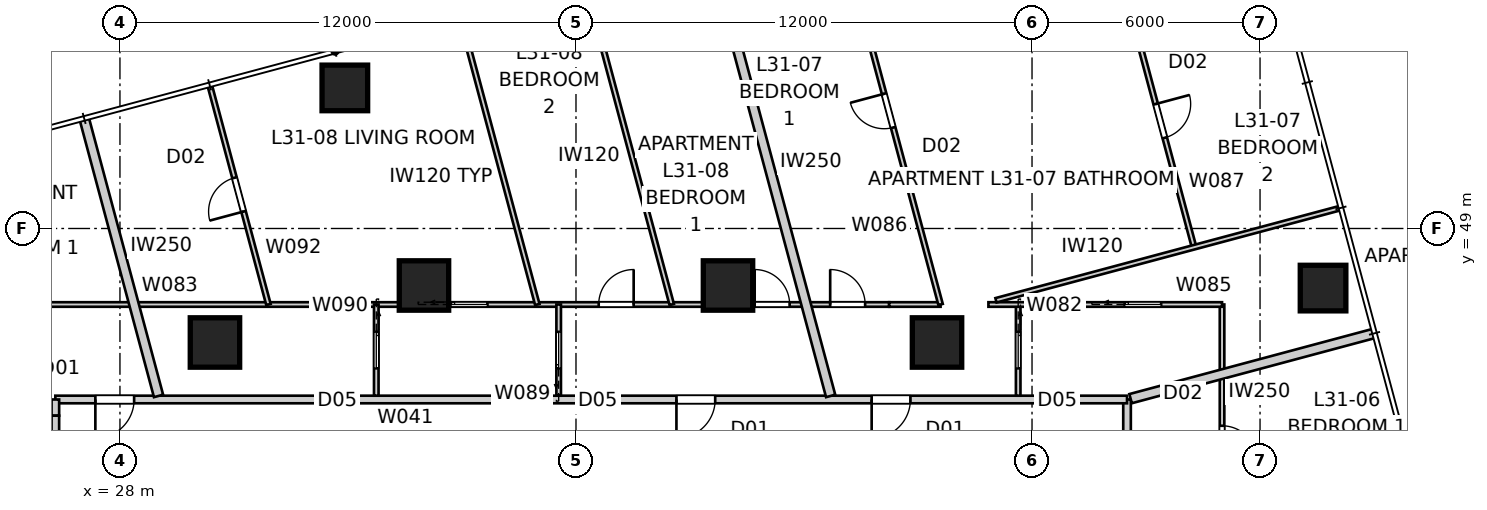
"""IFC4 building model, lengths in metres.
Left out: names, types, materials, properties, quantities, classifications, styles, units other than length and angle.
Written with IfcOpenShell. Run it as: python <this file> out.ifc"""

import sys

from ifc_helpers import new_model, si_unit, direction, frame, frame_2d, origin, origin_2d, place, context, subcontext, project, spatial, rectangle, extrude, element, fill, save


model = new_model("IFC4")
c1 = context("Model", 3, precision=1e-05, world=origin(), true_north=direction((0.0, 1.0)))
c2 = subcontext(c1, "Body", "Model", "MODEL_VIEW")
j1 = project(units=[si_unit("LENGTHUNIT", "METRE"), si_unit("PLANEANGLEUNIT", "RADIAN")], contexts=[c1])
p1 = place(None, origin())
s1 = spatial("IfcSite", under=j1, at=p1, CompositionType="ELEMENT")
p2 = place(p1, origin())
s2 = spatial("IfcBuilding", under=s1, at=p2, CompositionType="ELEMENT")
p3 = place(p2, frame((0.0, 0.0, 115.0)))
s3 = spatial("IfcBuildingStorey", under=s2, at=p3, CompositionType="ELEMENT", Elevation=115.0)
for number, where, z_axis, x_axis in (
    (1, (59.658, 47.432, 0.0), (0.0, 0.0, 1.0), (1.0, 0.0, 0.0)),
    (2, (33.918, 52.699, 0.0), (0.0, 0.0, 1.0), (1.0, 0.0, 0.0)),
):
    element("IfcColumn", number, at=place(p3, frame(where, z_axis=z_axis, x_axis=x_axis)), inside=s3, PredefinedType="COLUMN", context=c2, shape_type="SweptSolid", body=[
        extrude(rectangle(XDim=1.2, YDim=1.2, at=origin_2d()), origin(), (0.0, 0.0, 1.0), 3.4),
    ])
for number, where, z_axis, x_axis in (
    (3, (49.5, 46.0, 0.0), (0.0, 0.0, 1.0), (1.0, 0.0, 0.0)),
    (4, (44.0, 47.5, 0.0), (0.0, 0.0, 1.0), (1.0, 0.0, 0.0)),
    (5, (36.0, 47.5, 0.0), (0.0, 0.0, 1.0), (1.0, 0.0, 0.0)),
    (6, (30.5, 46.0, 0.0), (0.0, 0.0, 1.0), (1.0, 0.0, 0.0)),
):
    element("IfcColumn", number, at=place(p3, frame(where, z_axis=z_axis, x_axis=x_axis)), inside=s3, PredefinedType="COLUMN", context=c2, shape_type="SweptSolid", body=[
        extrude(rectangle(XDim=1.3, YDim=1.3, at=origin_2d()), origin(), (0.0, 0.0, 1.0), 3.4),
    ])
p4 = place(p3, frame((54.5, 15.5, 0.0), z_axis=(0.0, 0.0, 1.0), x_axis=(0.0, 1.0, 0.0)))
e7 = element("IfcWall", 7, at=p4, inside=s3, PredefinedType="PARTITIONING", context=c2, shape_type="SweptSolid", body=[
    extrude(rectangle(XDim=29.0, YDim=0.2, at=frame_2d((14.5, 0.0))), origin(), (0.0, 0.0, 1.0), 3.25),
])
p5 = place(p4, frame((24.76, 0.0, 0.0)))
e8 = element("IfcOpeningElement", 8, at=p5, cuts=e7, PredefinedType="OPENING", context=c2, shape_type="SweptSolid", body=[
    extrude(rectangle(XDim=1.02, YDim=2.1, at=frame_2d((0.51, 1.05))), frame((0.0, 0.11, 0.0), z_axis=(0.0, -1.0, 0.0), x_axis=(1.0, 0.0, 0.0)), (0.0, 0.0, 1.0), 0.22),
])
p6 = place(p4, frame((5.829, 0.0, 0.0)))
e9 = element("IfcOpeningElement", 9, at=p6, cuts=e7, PredefinedType="OPENING", context=c2, shape_type="SweptSolid", body=[
    extrude(rectangle(XDim=1.02, YDim=2.34, at=frame_2d((0.51, 1.17))), frame((0.0, 0.11, 0.0), z_axis=(0.0, -1.0, 0.0), x_axis=(1.0, 0.0, 0.0)), (0.0, 0.0, 1.0), 0.22),
])
p7 = place(p4, frame((9.559, 0.0, 0.0)))
e10 = element("IfcOpeningElement", 10, at=p7, cuts=e7, PredefinedType="OPENING", context=c2, shape_type="SweptSolid", body=[
    extrude(rectangle(XDim=1.02, YDim=2.34, at=frame_2d((0.51, 1.17))), frame((0.0, 0.11, 0.0), z_axis=(0.0, -1.0, 0.0), x_axis=(1.0, 0.0, 0.0)), (0.0, 0.0, 1.0), 0.22),
])
p8 = place(p3, frame((54.5, 44.5, 0.0), z_axis=(0.0, 0.0, 1.0), x_axis=(-1.0, 0.0, 0.0)))
e11 = element("IfcWall", 11, at=p8, inside=s3, PredefinedType="PARTITIONING", context=c2, shape_type="SweptSolid", body=[
    extrude(rectangle(XDim=28.2, YDim=0.2, at=frame_2d((14.1, 0.0))), origin(), (0.0, 0.0, 1.0), 3.25),
])
p9 = place(p8, frame((10.837, 0.0, 0.0)))
e12 = element("IfcOpeningElement", 12, at=p9, cuts=e11, PredefinedType="OPENING", context=c2, shape_type="SweptSolid", body=[
    extrude(rectangle(XDim=1.02, YDim=2.34, at=frame_2d((0.51, 1.17))), frame((0.0, 0.11, 0.0), z_axis=(0.0, -1.0, 0.0), x_axis=(1.0, 0.0, 0.0)), (0.0, 0.0, 1.0), 0.22),
])
p10 = place(p8, frame((5.7, 0.0, 0.0)))
e13 = element("IfcOpeningElement", 13, at=p10, cuts=e11, PredefinedType="OPENING", context=c2, shape_type="SweptSolid", body=[
    extrude(rectangle(XDim=1.02, YDim=2.34, at=frame_2d((0.51, 1.17))), frame((0.0, 0.11, 0.0), z_axis=(0.0, -1.0, 0.0), x_axis=(1.0, 0.0, 0.0)), (0.0, 0.0, 1.0), 0.22),
])
p11 = place(p8, frame((26.127, 0.0, 0.0)))
e14 = element("IfcOpeningElement", 14, at=p11, cuts=e11, PredefinedType="OPENING", context=c2, shape_type="SweptSolid", body=[
    extrude(rectangle(XDim=1.02, YDim=2.34, at=frame_2d((0.51, 1.17))), frame((0.0, 0.11, 0.0), z_axis=(0.0, -1.0, 0.0), x_axis=(1.0, 0.0, 0.0)), (0.0, 0.0, 1.0), 0.22),
])
p12 = place(p3, frame((26.3, 44.5, 0.0), z_axis=(0.0, 0.0, 1.0), x_axis=(0.0, -1.0, 0.0)))
e15 = element("IfcWall", 15, at=p12, inside=s3, PredefinedType="PARTITIONING", context=c2, shape_type="SweptSolid", body=[
    extrude(rectangle(XDim=0.426, YDim=0.2, at=frame_2d((0.213, 0.0))), origin(), (0.0, 0.0, 1.0), 3.25),
])
p13 = place(p3, frame((26.3, 44.074, 0.0), z_axis=(0.0, 0.0, 1.0), x_axis=(0.0, -1.0, 0.0)))
e16 = element("IfcWall", 16, at=p13, inside=s3, PredefinedType="PARTITIONING", context=c2, shape_type="SweptSolid", body=[
    extrude(rectangle(XDim=1.554, YDim=0.2, at=frame_2d((0.777, 0.0))), origin(), (0.0, 0.0, 1.0), 2.722),
])
p14 = place(p3, frame((43.56, 56.318, 0.0), z_axis=(0.0, 0.0, 1.0), x_axis=(0.258824223352, -0.965924438766, 0.0)))
e17 = element("IfcWall", 17, at=p14, inside=s3, PredefinedType="PARTITIONING", context=c2, shape_type="SweptSolid", body=[
    extrude(rectangle(XDim=12.138, YDim=0.25, at=frame_2d((6.069, 0.0))), origin(), (0.0, 0.0, 1.0), 3.25),
])
p15 = place(p3, frame((27.058, 51.896, 0.0), z_axis=(0.0, 0.0, 1.0), x_axis=(0.258822171171, -0.965924988656, 0.0)))
e18 = element("IfcWall", 18, at=p15, inside=s3, PredefinedType="PARTITIONING", context=c2, shape_type="SweptSolid", body=[
    extrude(rectangle(XDim=7.56, YDim=0.25, at=frame_2d((3.78, 0.0))), origin(), (0.0, 0.0, 1.0), 3.25),
])
p16 = place(p3, frame((61.012, 46.242, 0.0), z_axis=(0.0, 0.0, 1.0), x_axis=(-0.965929355837, -0.25880587229, 0.0)))
e19 = element("IfcWall", 19, at=p16, inside=s3, PredefinedType="PARTITIONING", context=c2, shape_type="SweptSolid", body=[
    extrude(rectangle(XDim=6.645, YDim=0.25, at=frame_2d((3.322, 0.0))), origin(), (0.0, 0.0, 1.0), 3.25),
])
p17 = place(p3, frame((57.0, 47.0, 0.0), z_axis=(0.0, 0.0, 1.0), x_axis=(0.0, -1.0, 0.0)))
e20 = element("IfcWall", 20, at=p17, inside=s3, PredefinedType="PARTITIONING", context=c2, shape_type="SweptSolid", body=[
    extrude(rectangle(XDim=34.0, YDim=0.12, at=frame_2d((17.0, 0.0))), origin(), (0.0, 0.0, 1.0), 2.55),
])
p18 = place(p17, frame((8.23, 0.0, 0.0)))
e21 = element("IfcOpeningElement", 21, at=p18, cuts=e20, PredefinedType="OPENING", context=c2, shape_type="SweptSolid", body=[
    extrude(rectangle(XDim=0.92, YDim=2.34, at=frame_2d((0.46, 1.17))), frame((0.0, 0.07, 0.0), z_axis=(0.0, -1.0, 0.0), x_axis=(1.0, 0.0, 0.0)), (0.0, 0.0, 1.0), 0.14),
])
p19 = place(p17, frame((3.192, 0.0, 0.0)))
e22 = element("IfcOpeningElement", 22, at=p19, cuts=e20, PredefinedType="OPENING", context=c2, shape_type="SweptSolid", body=[
    extrude(rectangle(XDim=0.92, YDim=2.34, at=frame_2d((0.46, 1.17))), frame((0.0, 0.07, 0.0), z_axis=(0.0, -1.0, 0.0), x_axis=(1.0, 0.0, 0.0)), (0.0, 0.0, 1.0), 0.14),
])
p20 = place(p17, frame((24.391, 0.0, 0.0)))
e23 = element("IfcOpeningElement", 23, at=p20, cuts=e20, PredefinedType="OPENING", context=c2, shape_type="SweptSolid", body=[
    extrude(rectangle(XDim=0.92, YDim=2.34, at=frame_2d((0.46, 1.17))), frame((0.0, 0.07, 0.0), z_axis=(0.0, -1.0, 0.0), x_axis=(1.0, 0.0, 0.0)), (0.0, 0.0, 1.0), 0.14),
])
p21 = place(p17, frame((21.702, 0.0, 0.0)))
e24 = element("IfcOpeningElement", 24, at=p21, cuts=e20, PredefinedType="OPENING", context=c2, shape_type="SweptSolid", body=[
    extrude(rectangle(XDim=0.92, YDim=2.34, at=frame_2d((0.46, 1.17))), frame((0.0, 0.07, 0.0), z_axis=(0.0, -1.0, 0.0), x_axis=(1.0, 0.0, 0.0)), (0.0, 0.0, 1.0), 0.14),
])
p22 = place(p17, frame((31.459, 0.0, 0.0)))
e25 = element("IfcOpeningElement", 25, at=p22, cuts=e20, PredefinedType="OPENING", context=c2, shape_type="SweptSolid", body=[
    extrude(rectangle(XDim=0.96, YDim=2.1, at=frame_2d((0.48, 1.05))), frame((0.0, 0.07, 0.0), z_axis=(0.0, -1.0, 0.0), x_axis=(1.0, 0.0, 0.0)), (0.0, 0.0, 1.0), 0.14),
])
p23 = place(p17, frame((13.759, 0.0, 0.0)))
e26 = element("IfcOpeningElement", 26, at=p23, cuts=e20, PredefinedType="OPENING", context=c2, shape_type="SweptSolid", body=[
    extrude(rectangle(XDim=0.96, YDim=2.1, at=frame_2d((0.48, 1.05))), frame((0.0, 0.07, 0.0), z_axis=(0.0, -1.0, 0.0), x_axis=(1.0, 0.0, 0.0)), (0.0, 0.0, 1.0), 0.14),
])
p24 = place(p3, frame((51.636, 47.0, 0.0), z_axis=(0.0, 0.0, 1.0), x_axis=(0.0, -1.0, 0.0)))
e27 = element("IfcWall", 27, at=p24, inside=s3, PredefinedType="PARTITIONING", context=c2, shape_type="SweptSolid", body=[
    extrude(rectangle(XDim=2.4, YDim=0.12, at=frame_2d((1.2, 0.0))), origin(), (0.0, 0.0, 1.0), 3.25),
])
p25 = place(p24, frame((0.72, 0.0, 0.0)))
e28 = element("IfcOpeningElement", 28, at=p25, cuts=e27, PredefinedType="OPENING", context=c2, shape_type="SweptSolid", body=[
    extrude(rectangle(XDim=0.96, YDim=2.1, at=frame_2d((0.48, 1.05))), frame((0.0, 0.07, 0.0), z_axis=(0.0, -1.0, 0.0), x_axis=(1.0, 0.0, 0.0)), (0.0, 0.0, 1.0), 0.14),
])
p26 = place(p3, frame((23.0, 47.0, 0.0), z_axis=(0.0, 0.0, 1.0), x_axis=(1.0, 0.0, 0.0)))
e29 = element("IfcWall", 29, at=p26, inside=s3, PredefinedType="PARTITIONING", context=c2, shape_type="SweptSolid", body=[
    extrude(rectangle(XDim=25.241, YDim=0.12, at=frame_2d((12.62, 0.0))), origin(), (0.0, 0.0, 1.0), 2.55),
])
p27 = place(p26, frame((21.702, 0.0, 0.0)))
e30 = element("IfcOpeningElement", 30, at=p27, cuts=e29, PredefinedType="OPENING", context=c2, shape_type="SweptSolid", body=[
    extrude(rectangle(XDim=0.92, YDim=2.34, at=frame_2d((0.46, 1.17))), frame((0.0, 0.07, 0.0), z_axis=(0.0, -1.0, 0.0), x_axis=(1.0, 0.0, 0.0)), (0.0, 0.0, 1.0), 0.14),
])
p28 = place(p26, frame((17.598, 0.0, 0.0)))
e31 = element("IfcOpeningElement", 31, at=p28, cuts=e29, PredefinedType="OPENING", context=c2, shape_type="SweptSolid", body=[
    extrude(rectangle(XDim=0.92, YDim=2.34, at=frame_2d((0.46, 1.17))), frame((0.0, 0.07, 0.0), z_axis=(0.0, -1.0, 0.0), x_axis=(1.0, 0.0, 0.0)), (0.0, 0.0, 1.0), 0.14),
])
p29 = place(p26, frame((23.689, 0.0, 0.0)))
e32 = element("IfcOpeningElement", 32, at=p29, cuts=e29, PredefinedType="OPENING", context=c2, shape_type="SweptSolid", body=[
    extrude(rectangle(XDim=0.92, YDim=2.34, at=frame_2d((0.46, 1.17))), frame((0.0, 0.07, 0.0), z_axis=(0.0, -1.0, 0.0), x_axis=(1.0, 0.0, 0.0)), (0.0, 0.0, 1.0), 0.14),
])
p30 = place(p26, frame((2.225, 0.0, 0.0)))
e33 = element("IfcOpeningElement", 33, at=p30, cuts=e29, PredefinedType="OPENING", context=c2, shape_type="SweptSolid", body=[
    extrude(rectangle(XDim=0.92, YDim=2.34, at=frame_2d((0.46, 1.17))), frame((0.0, 0.07, 0.0), z_axis=(0.0, -1.0, 0.0), x_axis=(1.0, 0.0, 0.0)), (0.0, 0.0, 1.0), 0.14),
])
p31 = place(p26, frame((13.709, 0.0, 0.0)))
e34 = element("IfcOpeningElement", 34, at=p31, cuts=e29, PredefinedType="OPENING", context=c2, shape_type="SweptSolid", body=[
    extrude(rectangle(XDim=0.96, YDim=2.1, at=frame_2d((0.48, 1.05))), frame((0.0, 0.07, 0.0), z_axis=(0.0, -1.0, 0.0), x_axis=(1.0, 0.0, 0.0)), (0.0, 0.0, 1.0), 0.14),
])
p32 = place(p3, frame((50.853, 47.0, 0.0), z_axis=(0.0, 0.0, 1.0), x_axis=(1.0, 0.0, 0.0)))
e35 = element("IfcWall", 35, at=p32, inside=s3, PredefinedType="PARTITIONING", context=c2, shape_type="SweptSolid", body=[
    extrude(rectangle(XDim=6.147, YDim=0.12, at=frame_2d((3.074, 0.0))), origin(), (0.0, 0.0, 1.0), 3.25),
])
p33 = place(p32, frame((3.585, 0.0, 0.0)))
e36 = element("IfcOpeningElement", 36, at=p33, cuts=e35, PredefinedType="OPENING", context=c2, shape_type="SweptSolid", body=[
    extrude(rectangle(XDim=0.96, YDim=2.1, at=frame_2d((0.48, 1.05))), frame((0.0, 0.07, 0.0), z_axis=(0.0, -1.0, 0.0), x_axis=(1.0, 0.0, 0.0)), (0.0, 0.0, 1.0), 0.14),
])
p34 = place(p3, frame((49.594, 47.0, 0.0), z_axis=(0.0, 0.0, 1.0), x_axis=(-0.258797552287, 0.965931585015, 0.0)))
e37 = element("IfcWall", 37, at=p34, inside=s3, PredefinedType="PARTITIONING", context=c2, shape_type="SweptSolid", body=[
    extrude(rectangle(XDim=10.522, YDim=0.12, at=frame_2d((5.261, 0.0))), origin(), (0.0, 0.0, 1.0), 2.722),
])
p35 = place(p34, frame((4.821, 0.0, 0.0)))
e38 = element("IfcOpeningElement", 38, at=p35, cuts=e37, PredefinedType="OPENING", context=c2, shape_type="SweptSolid", body=[
    extrude(rectangle(XDim=0.92, YDim=2.34, at=frame_2d((0.46, 1.17))), frame((0.0, 0.07, 0.0), z_axis=(0.0, -1.0, 0.0), x_axis=(1.0, 0.0, 0.0)), (0.0, 0.0, 1.0), 0.14),
])
p36 = place(p3, frame((54.506, 55.069, 0.0), z_axis=(0.0, 0.0, 1.0), x_axis=(0.258830095464, -0.965922865286, 0.0)))
e39 = element("IfcWall", 39, at=p36, inside=s3, PredefinedType="PARTITIONING", context=c2, shape_type="SweptSolid", body=[
    extrude(rectangle(XDim=6.793, YDim=0.12, at=frame_2d((3.396, 0.0))), origin(), (0.0, 0.0, 1.0), 3.25),
])
p37 = place(p36, frame((2.892, 0.0, 0.0)))
e40 = element("IfcOpeningElement", 40, at=p37, cuts=e39, PredefinedType="OPENING", context=c2, shape_type="SweptSolid", body=[
    extrude(rectangle(XDim=0.92, YDim=2.34, at=frame_2d((0.46, 1.17))), frame((0.0, 0.07, 0.0), z_axis=(0.0, -1.0, 0.0), x_axis=(1.0, 0.0, 0.0)), (0.0, 0.0, 1.0), 0.14),
])
p38 = place(p3, frame((60.089, 49.532, 0.0), z_axis=(0.0, 0.0, 1.0), x_axis=(-0.965927203676, -0.25881390457, 0.0)))
e41 = element("IfcWall", 41, at=p38, inside=s3, PredefinedType="PARTITIONING", context=c2, shape_type="SweptSolid", body=[
    extrude(rectangle(XDim=9.357, YDim=0.12, at=frame_2d((4.678, 0.0))), origin(), (0.0, 0.0, 1.0), 2.638),
])
p39 = place(p3, frame((39.544, 44.6, 0.0), z_axis=(0.0, 0.0, 1.0), x_axis=(0.0, 1.0, 0.0)))
e42 = element("IfcWall", 42, at=p39, inside=s3, PredefinedType="PARTITIONING", context=c2, shape_type="SweptSolid", body=[
    extrude(rectangle(XDim=2.4, YDim=0.12, at=frame_2d((1.2, 0.0))), origin(), (0.0, 0.0, 1.0), 3.25),
])
p40 = place(p39, frame((0.72, 0.0, 0.0)))
e43 = element("IfcOpeningElement", 43, at=p40, cuts=e42, PredefinedType="OPENING", context=c2, shape_type="SweptSolid", body=[
    extrude(rectangle(XDim=0.96, YDim=2.1, at=frame_2d((0.48, 1.05))), frame((0.0, 0.07, 0.0), z_axis=(0.0, -1.0, 0.0), x_axis=(1.0, 0.0, 0.0)), (0.0, 0.0, 1.0), 0.14),
])
p41 = place(p3, frame((34.745, 47.0, 0.0), z_axis=(0.0, 0.0, 1.0), x_axis=(0.0, -1.0, 0.0)))
e44 = element("IfcWall", 44, at=p41, inside=s3, PredefinedType="PARTITIONING", context=c2, shape_type="SweptSolid", body=[
    extrude(rectangle(XDim=2.4, YDim=0.12, at=frame_2d((1.2, 0.0))), origin(), (0.0, 0.0, 1.0), 3.25),
])
p42 = place(p41, frame((0.72, 0.0, 0.0)))
e45 = element("IfcOpeningElement", 45, at=p42, cuts=e44, PredefinedType="OPENING", context=c2, shape_type="SweptSolid", body=[
    extrude(rectangle(XDim=0.96, YDim=2.1, at=frame_2d((0.48, 1.05))), frame((0.0, 0.07, 0.0), z_axis=(0.0, -1.0, 0.0), x_axis=(1.0, 0.0, 0.0)), (0.0, 0.0, 1.0), 0.14),
])
p43 = place(p3, frame((36.969, 54.511, 0.0), z_axis=(0.0, 0.0, 1.0), x_axis=(0.258813509689, -0.965927309482, 0.0)))
e46 = element("IfcWall", 46, at=p43, inside=s3, PredefinedType="PARTITIONING", context=c2, shape_type="SweptSolid", body=[
    extrude(rectangle(XDim=7.776, YDim=0.12, at=frame_2d((3.888, 0.0))), origin(), (0.0, 0.0, 1.0), 3.25),
])
p44 = place(p3, frame((31.908, 47.0, 0.0), z_axis=(0.0, 0.0, 1.0), x_axis=(-0.258812722515, 0.965927520399, 0.0)))
e47 = element("IfcWall", 47, at=p44, inside=s3, PredefinedType="PARTITIONING", context=c2, shape_type="SweptSolid", body=[
    extrude(rectangle(XDim=5.945, YDim=0.12, at=frame_2d((2.972, 0.0))), origin(), (0.0, 0.0, 1.0), 3.25),
])
p45 = place(p44, frame((2.532, 0.0, 0.0)))
e48 = element("IfcOpeningElement", 48, at=p45, cuts=e47, PredefinedType="OPENING", context=c2, shape_type="SweptSolid", body=[
    extrude(rectangle(XDim=0.92, YDim=2.34, at=frame_2d((0.46, 1.17))), frame((0.0, 0.07, 0.0), z_axis=(0.0, -1.0, 0.0), x_axis=(1.0, 0.0, 0.0)), (0.0, 0.0, 1.0), 0.14),
])
p46 = place(p3, frame((42.519, 47.0, 0.0), z_axis=(0.0, 0.0, 1.0), x_axis=(-0.258819860698, 0.965925607751, 0.0)))
e49 = element("IfcWall", 49, at=p46, inside=s3, PredefinedType="PARTITIONING", context=c2, shape_type="SweptSolid", body=[
    extrude(rectangle(XDim=8.691, YDim=0.12, at=frame_2d((4.346, 0.0))), origin(), (0.0, 0.0, 1.0), 3.25),
])
p47 = place(p3, frame((48.241, 47.0, 0.0), z_axis=(0.0, 0.0, 1.0), x_axis=(1.0, 0.0, 0.0)))
e50 = element("IfcWall", 50, at=p47, inside=s3, PredefinedType="PARTITIONING", context=c2, shape_type="SweptSolid", body=[
    extrude(rectangle(XDim=1.353, YDim=0.12, at=frame_2d((0.676, 0.0))), origin(), (0.0, 0.0, 1.0), 3.25),
])
p48 = place(p9, origin())
e51 = element("IfcDoor", 51, at=p48, inside=s3, OperationType="SINGLE_SWING_RIGHT", PredefinedType="DOOR", context=c2, shape_type="SweptSolid", body=[
    extrude(rectangle(XDim=1.02, YDim=2.34, at=frame_2d((0.51, 1.17))), frame((0.0, 0.025, 0.0), z_axis=(0.0, -1.0, 0.0), x_axis=(1.0, 0.0, 0.0)), (0.0, 0.0, 1.0), 0.05),
])
fill(e12, e51)
p49 = place(p10, origin())
e52 = element("IfcDoor", 52, at=p49, inside=s3, OperationType="SINGLE_SWING_RIGHT", PredefinedType="DOOR", context=c2, shape_type="SweptSolid", body=[
    extrude(rectangle(XDim=1.02, YDim=2.34, at=frame_2d((0.51, 1.17))), frame((0.0, 0.025, 0.0), z_axis=(0.0, -1.0, 0.0), x_axis=(1.0, 0.0, 0.0)), (0.0, 0.0, 1.0), 0.05),
])
fill(e13, e52)
p50 = place(p11, origin())
e53 = element("IfcDoor", 53, at=p50, inside=s3, OperationType="SINGLE_SWING_RIGHT", PredefinedType="DOOR", context=c2, shape_type="SweptSolid", body=[
    extrude(rectangle(XDim=1.02, YDim=2.34, at=frame_2d((0.51, 1.17))), frame((0.0, 0.025, 0.0), z_axis=(0.0, -1.0, 0.0), x_axis=(1.0, 0.0, 0.0)), (0.0, 0.0, 1.0), 0.05),
])
fill(e14, e53)
p51 = place(p27, origin())
e54 = element("IfcDoor", 54, at=p51, inside=s3, OperationType="SINGLE_SWING_LEFT", PredefinedType="DOOR", context=c2, shape_type="SweptSolid", body=[
    extrude(rectangle(XDim=0.92, YDim=2.34, at=frame_2d((0.46, 1.17))), frame((0.0, 0.025, 0.0), z_axis=(0.0, -1.0, 0.0), x_axis=(1.0, 0.0, 0.0)), (0.0, 0.0, 1.0), 0.05),
])
fill(e30, e54)
p52 = place(p28, origin())
e55 = element("IfcDoor", 55, at=p52, inside=s3, OperationType="SINGLE_SWING_RIGHT", PredefinedType="DOOR", context=c2, shape_type="SweptSolid", body=[
    extrude(rectangle(XDim=0.92, YDim=2.34, at=frame_2d((0.46, 1.17))), frame((0.0, 0.025, 0.0), z_axis=(0.0, -1.0, 0.0), x_axis=(1.0, 0.0, 0.0)), (0.0, 0.0, 1.0), 0.05),
])
fill(e31, e55)
p53 = place(p40, origin())
e56 = element("IfcDoor", 56, at=p53, inside=s3, OperationType="SLIDING_TO_LEFT", PredefinedType="DOOR", context=c2, shape_type="SweptSolid", body=[
    extrude(rectangle(XDim=0.96, YDim=2.1, at=frame_2d((0.48, 1.05))), frame((0.0, 0.025, 0.0), z_axis=(0.0, -1.0, 0.0), x_axis=(1.0, 0.0, 0.0)), (0.0, 0.0, 1.0), 0.05),
])
fill(e43, e56)
p54 = place(p19, origin())
e57 = element("IfcDoor", 57, at=p54, inside=s3, OperationType="SINGLE_SWING_RIGHT", PredefinedType="DOOR", context=c2, shape_type="SweptSolid", body=[
    extrude(rectangle(XDim=0.92, YDim=2.34, at=frame_2d((0.46, 1.17))), frame((0.0, 0.025, 0.0), z_axis=(0.0, -1.0, 0.0), x_axis=(1.0, 0.0, 0.0)), (0.0, 0.0, 1.0), 0.05),
])
fill(e22, e57)
p55 = place(p25, origin())
e58 = element("IfcDoor", 58, at=p55, inside=s3, OperationType="SLIDING_TO_LEFT", PredefinedType="DOOR", context=c2, shape_type="SweptSolid", body=[
    extrude(rectangle(XDim=0.96, YDim=2.1, at=frame_2d((0.48, 1.05))), frame((0.0, 0.025, 0.0), z_axis=(0.0, -1.0, 0.0), x_axis=(1.0, 0.0, 0.0)), (0.0, 0.0, 1.0), 0.05),
])
fill(e28, e58)
p56 = place(p29, origin())
e59 = element("IfcDoor", 59, at=p56, inside=s3, OperationType="SINGLE_SWING_LEFT", PredefinedType="DOOR", context=c2, shape_type="SweptSolid", body=[
    extrude(rectangle(XDim=0.92, YDim=2.34, at=frame_2d((0.46, 1.17))), frame((0.0, 0.025, 0.0), z_axis=(0.0, -1.0, 0.0), x_axis=(1.0, 0.0, 0.0)), (0.0, 0.0, 1.0), 0.05),
])
fill(e32, e59)
p57 = place(p31, origin())
e60 = element("IfcDoor", 60, at=p57, inside=s3, OperationType="SLIDING_TO_LEFT", PredefinedType="DOOR", context=c2, shape_type="SweptSolid", body=[
    extrude(rectangle(XDim=0.96, YDim=2.1, at=frame_2d((0.48, 1.05))), frame((0.0, 0.025, 0.0), z_axis=(0.0, -1.0, 0.0), x_axis=(1.0, 0.0, 0.0)), (0.0, 0.0, 1.0), 0.05),
])
fill(e34, e60)
p58 = place(p42, origin())
e61 = element("IfcDoor", 61, at=p58, inside=s3, OperationType="SLIDING_TO_LEFT", PredefinedType="DOOR", context=c2, shape_type="SweptSolid", body=[
    extrude(rectangle(XDim=0.96, YDim=2.1, at=frame_2d((0.48, 1.05))), frame((0.0, 0.025, 0.0), z_axis=(0.0, -1.0, 0.0), x_axis=(1.0, 0.0, 0.0)), (0.0, 0.0, 1.0), 0.05),
])
fill(e45, e61)
p59 = place(p33, origin())
e62 = element("IfcDoor", 62, at=p59, inside=s3, OperationType="SLIDING_TO_LEFT", PredefinedType="DOOR", context=c2, shape_type="SweptSolid", body=[
    extrude(rectangle(XDim=0.96, YDim=2.1, at=frame_2d((0.48, 1.05))), frame((0.0, 0.025, 0.0), z_axis=(0.0, -1.0, 0.0), x_axis=(1.0, 0.0, 0.0)), (0.0, 0.0, 1.0), 0.05),
])
fill(e36, e62)
p60 = place(p45, origin())
e63 = element("IfcDoor", 63, at=p60, inside=s3, OperationType="SINGLE_SWING_LEFT", PredefinedType="DOOR", context=c2, shape_type="SweptSolid", body=[
    extrude(rectangle(XDim=0.92, YDim=2.34, at=frame_2d((0.46, 1.17))), frame((0.0, 0.025, 0.0), z_axis=(0.0, -1.0, 0.0), x_axis=(1.0, 0.0, 0.0)), (0.0, 0.0, 1.0), 0.05),
])
fill(e48, e63)
p61 = place(p35, origin())
e64 = element("IfcDoor", 64, at=p61, inside=s3, OperationType="SINGLE_SWING_RIGHT", PredefinedType="DOOR", context=c2, shape_type="SweptSolid", body=[
    extrude(rectangle(XDim=0.92, YDim=2.34, at=frame_2d((0.46, 1.17))), frame((0.0, 0.025, 0.0), z_axis=(0.0, -1.0, 0.0), x_axis=(1.0, 0.0, 0.0)), (0.0, 0.0, 1.0), 0.05),
])
fill(e38, e64)
p62 = place(p37, origin())
e65 = element("IfcDoor", 65, at=p62, inside=s3, OperationType="SINGLE_SWING_LEFT", PredefinedType="DOOR", context=c2, shape_type="SweptSolid", body=[
    extrude(rectangle(XDim=0.92, YDim=2.34, at=frame_2d((0.46, 1.17))), frame((0.0, 0.025, 0.0), z_axis=(0.0, -1.0, 0.0), x_axis=(1.0, 0.0, 0.0)), (0.0, 0.0, 1.0), 0.05),
])
fill(e40, e65)
save(model, sys.argv[1])
